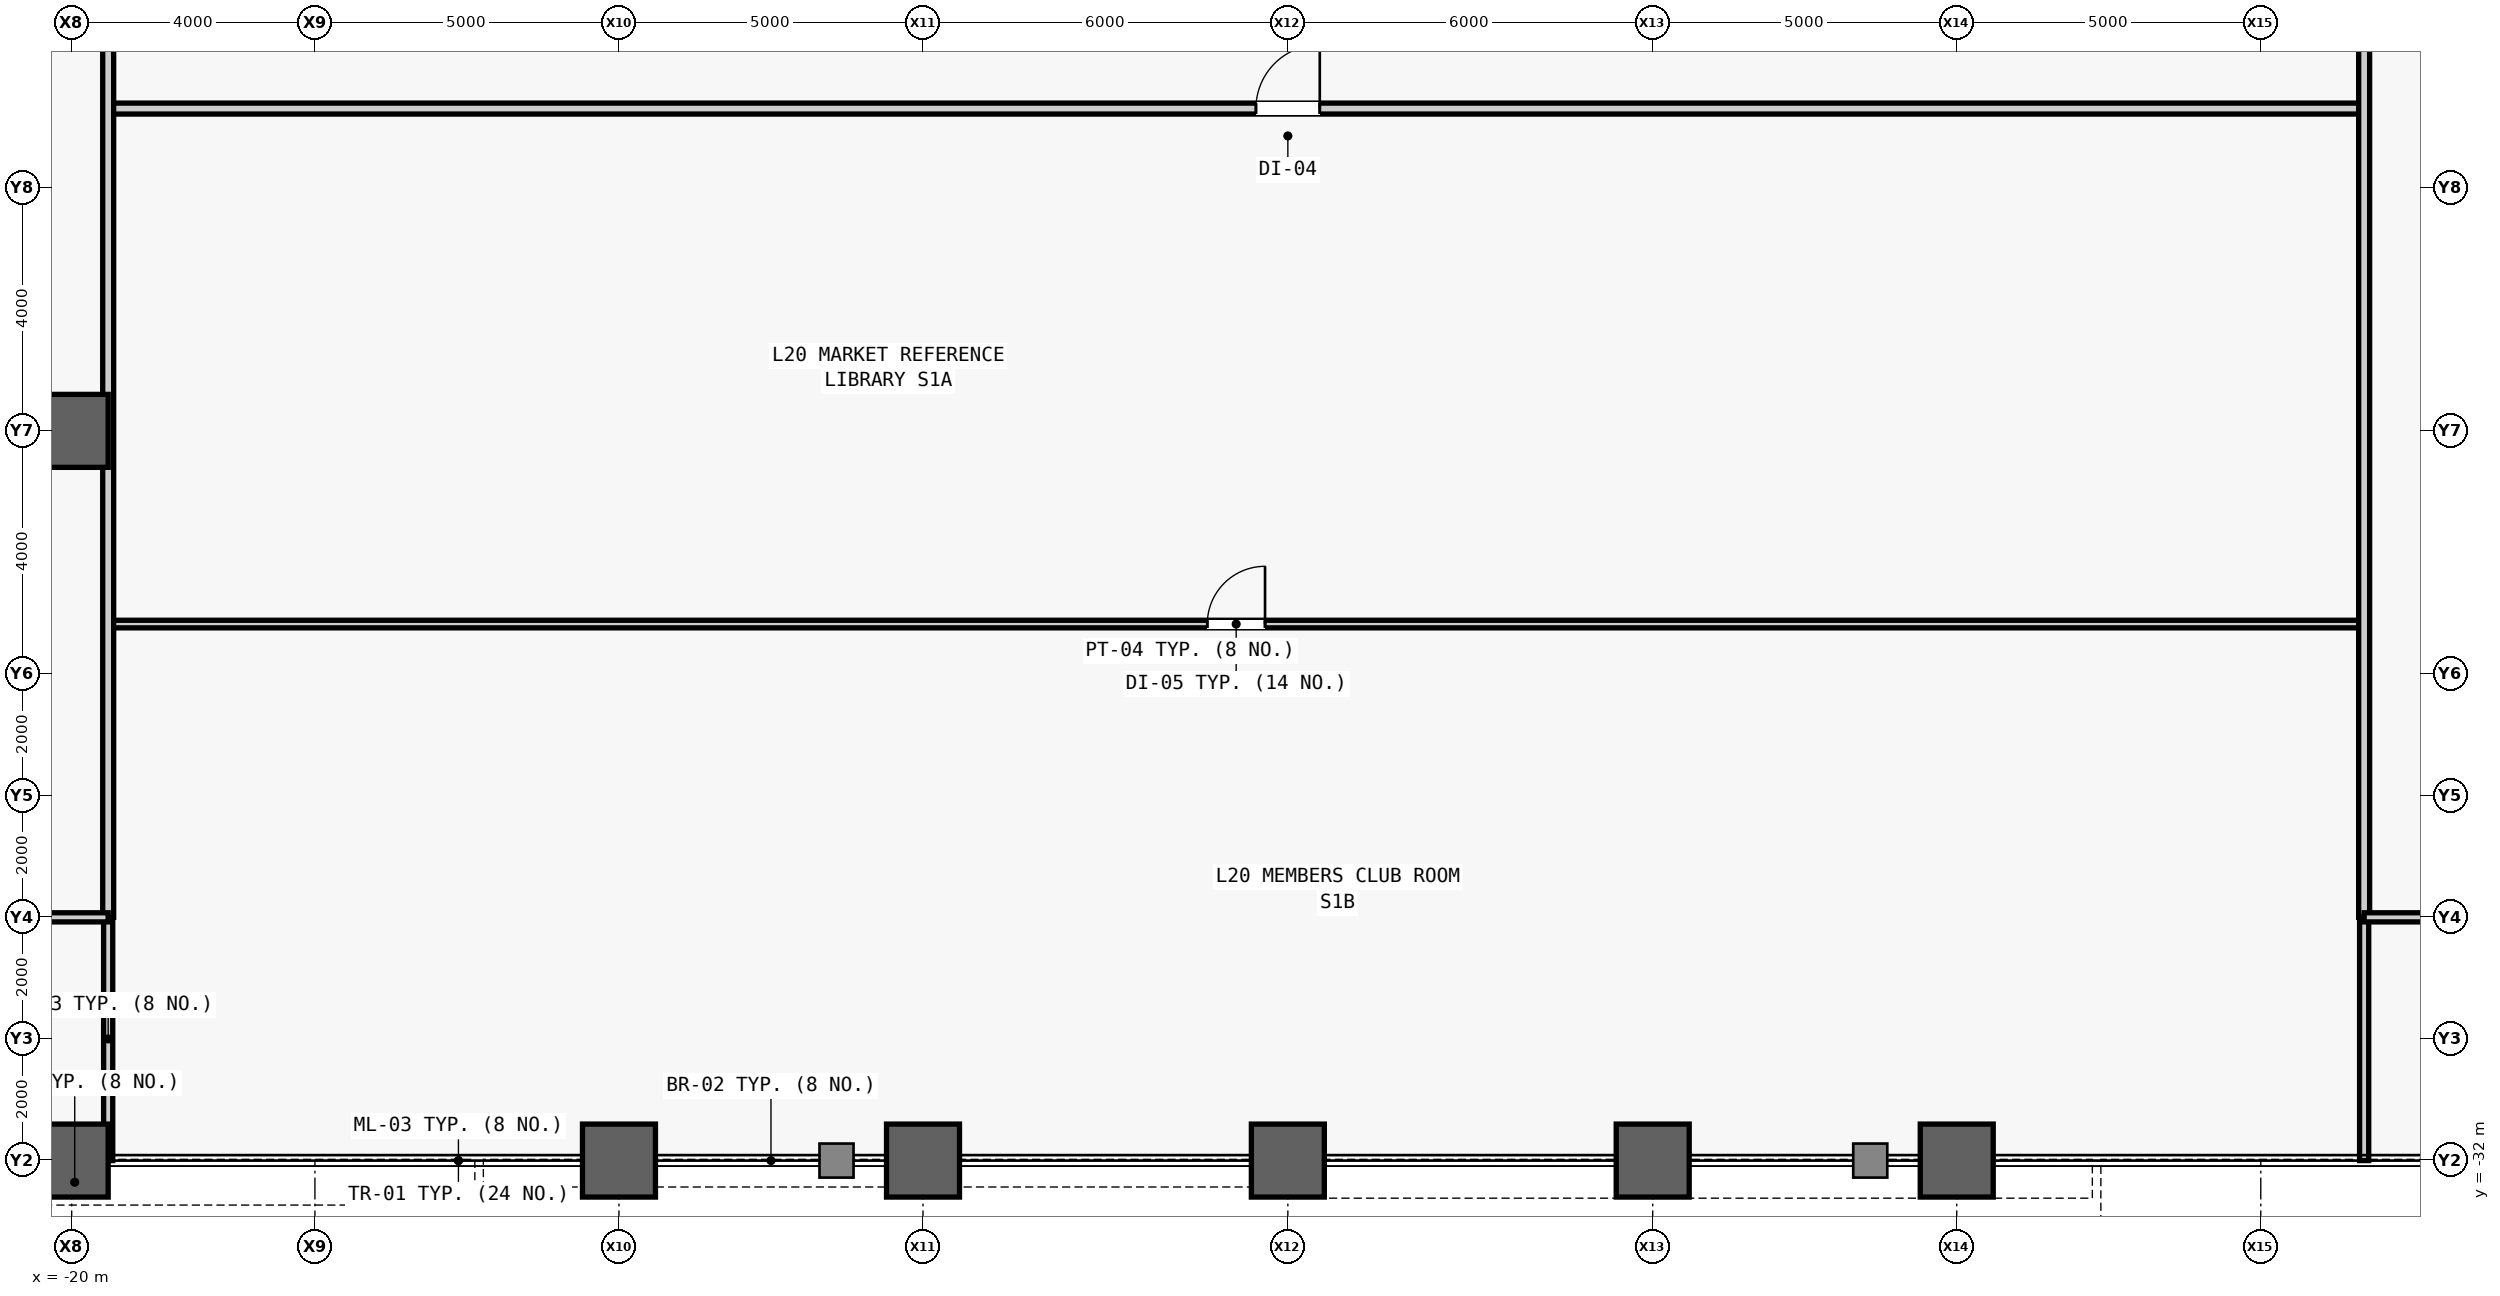
"""IFC4 building model, lengths in metres.
Left out: names, types, materials, properties, quantities, classifications, styles, units other than length and angle.
Written with IfcOpenShell. Run it as: python <this file> out.ifc"""

import sys

from ifc_helpers import new_model, si_unit, direction, frame, frame_2d, origin, origin_2d, place, context, subcontext, project, spatial, rectangle, hollow_rectangle, extrude, source, transform, mapped, element, fill, save


model = new_model("IFC4")
c1 = context("Model", 3, precision=1e-05, world=origin(), true_north=direction((0.0, 1.0)))
c2 = subcontext(c1, "Body", "Model", "MODEL_VIEW")
j1 = project(units=[si_unit("LENGTHUNIT", "METRE"), si_unit("PLANEANGLEUNIT", "RADIAN")], contexts=[c1])
p1 = place(None, origin())
s1 = spatial("IfcSite", under=j1, at=p1, CompositionType="ELEMENT")
p2 = place(p1, origin())
s2 = spatial("IfcBuilding", under=s1, at=p2, CompositionType="ELEMENT")
p3 = place(p2, frame((0.0, 0.0, 91.4)))
s3 = spatial("IfcBuildingStorey", under=s2, at=p3, CompositionType="ELEMENT", Elevation=91.4)
m1 = source(origin(), c2, "Body", "SweptSolid", [
    extrude(hollow_rectangle(XDim=1.2, YDim=1.2, WallThickness=0.07, at=origin_2d()), origin(), (0.0, 0.0, 1.0), 4.1),
])
for number, where, z_axis, x_axis in (
    (1, (-20.0, -32.0, 0.0), (0.0, 0.0, 1.0), (1.0, 0.0, 0.0)),
    (2, (-20.0, -20.0, 0.0), (0.0, 0.0, 1.0), (1.0, 0.0, 0.0)),
    (3, (-11.0, -32.0, 0.0), (0.0, 0.0, 1.0), (1.0, 0.0, 0.0)),
    (4, (-6.0, -32.0, 0.0), (0.0, 0.0, 1.0), (1.0, 0.0, 0.0)),
    (5, (0.0, -32.0, 0.0), (0.0, 0.0, 1.0), (1.0, 0.0, 0.0)),
    (6, (6.0, -32.0, 0.0), (0.0, 0.0, 1.0), (1.0, 0.0, 0.0)),
    (7, (11.0, -32.0, 0.0), (0.0, 0.0, 1.0), (1.0, 0.0, 0.0)),
):
    element("IfcColumn", number, at=place(p3, frame(where, z_axis=z_axis, x_axis=x_axis)), inside=s3, PredefinedType="COLUMN", context=c2, shape_type="MappedRepresentation", body=[
        mapped(m1, transform((0.0, 0.0, 0.0), scale=1.0)),
    ])
m2 = source(origin(), c2, "Body", "SweptSolid", [
    extrude(rectangle(XDim=37.1, YDim=0.125, at=frame_2d((18.55, 0.0))), origin(), (0.0, 0.0, 1.0), 3.84),
])
p4 = place(p3, frame((-19.4, -23.177, 0.0), z_axis=(0.0, 0.0, 1.0), x_axis=(1.0, 0.0, 0.0)))
e8 = element("IfcWall", 8, at=p4, inside=s3, PredefinedType="PARTITIONING", context=c2, shape_type="MappedRepresentation", body=[
    mapped(m2, transform((0.0, 0.0, 0.0), scale=1.0)),
])
m3 = source(origin(), c2, "Body", "SweptSolid", [
    extrude(rectangle(XDim=0.95, YDim=2.15, at=frame_2d((0.475, 1.075))), frame((0.0, 0.073, 0.0), z_axis=(0.0, -1.0, 0.0), x_axis=(1.0, 0.0, 0.0)), (0.0, 0.0, 1.0), 0.145),
])
p5 = place(p4, frame((18.075, 0.0, 0.0)))
e9 = element("IfcOpeningElement", 9, at=p5, cuts=e8, PredefinedType="OPENING", context=c2, shape_type="MappedRepresentation", body=[
    mapped(m3, transform((0.0, 0.0, 0.0), scale=1.0)),
])
m4 = source(origin(), c2, "Body", "SweptSolid", [
    extrude(rectangle(XDim=37.1, YDim=0.18, at=frame_2d((18.55, 0.0))), origin(), (0.0, 0.0, 1.0), 3.84),
])
p6 = place(p3, frame((-19.4, -14.7, 0.0), z_axis=(0.0, 0.0, 1.0), x_axis=(1.0, 0.0, 0.0)))
e10 = element("IfcWall", 10, at=p6, inside=s3, PredefinedType="PARTITIONING", context=c2, shape_type="MappedRepresentation", body=[
    mapped(m4, transform((0.0, 0.0, 0.0), scale=1.0)),
])
m5 = source(origin(), c2, "Body", "SweptSolid", [
    extrude(rectangle(XDim=1.05, YDim=2.2, at=frame_2d((0.525, 1.1))), frame((0.0, 0.1, 0.0), z_axis=(0.0, -1.0, 0.0), x_axis=(1.0, 0.0, 0.0)), (0.0, 0.0, 1.0), 0.2),
])
p7 = place(p6, frame((18.875, 0.0, 0.0)))
e11 = element("IfcOpeningElement", 11, at=p7, cuts=e10, PredefinedType="OPENING", context=c2, shape_type="MappedRepresentation", body=[
    mapped(m5, transform((0.0, 0.0, 0.0), scale=1.0)),
])
m6 = source(origin(), c2, "Body", "SweptSolid", [
    extrude(rectangle(XDim=4.0, YDim=0.15, at=frame_2d((2.0, 0.0))), origin(), (0.0, 0.0, 1.0), 3.84),
])
for number, where, z_axis, x_axis in (
    (12, (-19.4, -32.0, 0.0), (0.0, 0.0, 1.0), (0.0, 1.0, 0.0)),
    (13, (17.7, -32.0, 0.0), (0.0, 0.0, 1.0), (0.0, 1.0, 0.0)),
):
    element("IfcWall", number, at=place(p3, frame(where, z_axis=z_axis, x_axis=x_axis)), inside=s3, PredefinedType="PARTITIONING", context=c2, shape_type="MappedRepresentation", body=[
        mapped(m6, transform((0.0, 0.0, 0.0), scale=1.0)),
    ])
m7 = source(origin(), c2, "Body", "SweptSolid", [
    extrude(rectangle(XDim=56.0, YDim=0.18, at=frame_2d((28.0, 0.0))), origin(), (0.0, 0.0, 1.0), 3.371),
])
p8 = place(p3, frame((-19.4, -28.0, 0.0), z_axis=(0.0, 0.0, 1.0), x_axis=(0.0, 1.0, 0.0)))
e14 = element("IfcWall", 14, at=p8, inside=s3, PredefinedType="PARTITIONING", context=c2, shape_type="MappedRepresentation", body=[
    mapped(m7, transform((0.0, 0.0, 0.0), scale=1.0)),
])
m8 = source(origin(), c2, "Body", "SweptSolid", [
    extrude(rectangle(XDim=0.95, YDim=2.15, at=frame_2d((0.475, 1.075))), frame((0.0, 0.1, 0.0), z_axis=(0.0, -1.0, 0.0), x_axis=(1.0, 0.0, 0.0)), (0.0, 0.0, 1.0), 0.2),
])
p9 = place(p8, frame((16.299, 0.0, 0.0)))
e15 = element("IfcOpeningElement", 15, at=p9, cuts=e14, PredefinedType="OPENING", context=c2, shape_type="MappedRepresentation", body=[
    mapped(m8, transform((0.0, 0.0, 0.0), scale=1.0)),
])
p10 = place(p8, frame((22.923, 0.0, 0.0)))
e16 = element("IfcOpeningElement", 16, at=p10, cuts=e14, PredefinedType="OPENING", context=c2, shape_type="MappedRepresentation", body=[
    mapped(m8, transform((0.0, 0.0, 0.0), scale=1.0)),
])
p11 = place(p8, frame((30.712, 0.0, 0.0)))
e17 = element("IfcOpeningElement", 17, at=p11, cuts=e14, PredefinedType="OPENING", context=c2, shape_type="MappedRepresentation", body=[
    mapped(m8, transform((0.0, 0.0, 0.0), scale=1.0)),
])
p12 = place(p8, frame((37.913, 0.0, 0.0)))
e18 = element("IfcOpeningElement", 18, at=p12, cuts=e14, PredefinedType="OPENING", context=c2, shape_type="MappedRepresentation", body=[
    mapped(m8, transform((0.0, 0.0, 0.0), scale=1.0)),
])
m9 = source(origin(), c2, "Body", "SweptSolid", [
    extrude(rectangle(XDim=56.0, YDim=0.18, at=frame_2d((28.0, 0.0))), origin(), (0.0, 0.0, 1.0), 3.84),
])
p13 = place(p3, frame((17.7, -28.0, 0.0), z_axis=(0.0, 0.0, 1.0), x_axis=(0.0, 1.0, 0.0)))
e19 = element("IfcWall", 19, at=p13, inside=s3, PredefinedType="PARTITIONING", context=c2, shape_type="MappedRepresentation", body=[
    mapped(m9, transform((0.0, 0.0, 0.0), scale=1.0)),
])
p14 = place(p13, frame((16.587, 0.0, 0.0)))
e20 = element("IfcOpeningElement", 20, at=p14, cuts=e19, PredefinedType="OPENING", context=c2, shape_type="MappedRepresentation", body=[
    mapped(m8, transform((0.0, 0.0, 0.0), scale=1.0)),
])
p15 = place(p13, frame((23.788, 0.0, 0.0)))
e21 = element("IfcOpeningElement", 21, at=p15, cuts=e19, PredefinedType="OPENING", context=c2, shape_type="MappedRepresentation", body=[
    mapped(m8, transform((0.0, 0.0, 0.0), scale=1.0)),
])
p16 = place(p13, frame((31.577, 0.0, 0.0)))
e22 = element("IfcOpeningElement", 22, at=p16, cuts=e19, PredefinedType="OPENING", context=c2, shape_type="MappedRepresentation", body=[
    mapped(m8, transform((0.0, 0.0, 0.0), scale=1.0)),
])
p17 = place(p13, frame((38.201, 0.0, 0.0)))
e23 = element("IfcOpeningElement", 23, at=p17, cuts=e19, PredefinedType="OPENING", context=c2, shape_type="MappedRepresentation", body=[
    mapped(m8, transform((0.0, 0.0, 0.0), scale=1.0)),
])
m10 = source(origin(), c2, "Body", "SweptSolid", [
    extrude(rectangle(XDim=8.6, YDim=0.15, at=frame_2d((4.3, 0.0))), origin(), (0.0, 0.0, 1.0), 3.84),
])
p18 = place(p3, frame((-28.0, -28.0, 0.0), z_axis=(0.0, 0.0, 1.0), x_axis=(1.0, 0.0, 0.0)))
e24 = element("IfcWall", 24, at=p18, inside=s3, PredefinedType="PARTITIONING", context=c2, shape_type="MappedRepresentation", body=[
    mapped(m10, transform((0.0, 0.0, 0.0), scale=1.0)),
])
m11 = source(origin(), c2, "Body", "SweptSolid", [
    extrude(rectangle(XDim=0.95, YDim=2.15, at=frame_2d((0.475, 1.075))), frame((0.0, 0.085, 0.0), z_axis=(0.0, -1.0, 0.0), x_axis=(1.0, 0.0, 0.0)), (0.0, 0.0, 1.0), 0.17),
])
p19 = place(p18, frame((3.825, 0.0, 0.0)))
e25 = element("IfcOpeningElement", 25, at=p19, cuts=e24, PredefinedType="OPENING", context=c2, shape_type="MappedRepresentation", body=[
    mapped(m11, transform((0.0, 0.0, 0.0), scale=1.0)),
])
m12 = source(origin(), c2, "Body", "SweptSolid", [
    extrude(rectangle(XDim=10.3, YDim=0.15, at=frame_2d((5.15, 0.0))), origin(), (0.0, 0.0, 1.0), 3.84),
])
p20 = place(p3, frame((17.7, -28.0, 0.0), z_axis=(0.0, 0.0, 1.0), x_axis=(1.0, 0.0, 0.0)))
e26 = element("IfcWall", 26, at=p20, inside=s3, PredefinedType="PARTITIONING", context=c2, shape_type="MappedRepresentation", body=[
    mapped(m12, transform((0.0, 0.0, 0.0), scale=1.0)),
])
p21 = place(p20, frame((4.675, 0.0, 0.0)))
e27 = element("IfcOpeningElement", 27, at=p21, cuts=e26, PredefinedType="OPENING", context=c2, shape_type="MappedRepresentation", body=[
    mapped(m11, transform((0.0, 0.0, 0.0), scale=1.0)),
])
m13 = source(origin(), c2, "Body", "SweptSolid", [
    extrude(rectangle(XDim=0.95, YDim=2.15, at=frame_2d((0.475, 1.075))), frame((0.0, 0.025, 0.0), z_axis=(0.0, -1.0, 0.0), x_axis=(1.0, 0.0, 0.0)), (0.0, 0.0, 1.0), 0.05),
])
p22 = place(p5, origin())
e28 = element("IfcDoor", 28, at=p22, inside=s3, OperationType="SINGLE_SWING_RIGHT", PredefinedType="DOOR", context=c2, shape_type="MappedRepresentation", body=[
    mapped(m13, transform((0.0, 0.0, 0.0), scale=1.0)),
])
fill(e9, e28)
m14 = source(origin(), c2, "Body", "SweptSolid", [
    extrude(rectangle(XDim=1.05, YDim=2.2, at=frame_2d((0.525, 1.1))), frame((0.0, 0.025, 0.0), z_axis=(0.0, -1.0, 0.0), x_axis=(1.0, 0.0, 0.0)), (0.0, 0.0, 1.0), 0.05),
])
p23 = place(p7, origin())
e29 = element("IfcDoor", 29, at=p23, inside=s3, OperationType="SINGLE_SWING_RIGHT", PredefinedType="DOOR", context=c2, shape_type="MappedRepresentation", body=[
    mapped(m14, transform((0.0, 0.0, 0.0), scale=1.0)),
])
fill(e11, e29)
save(model, sys.argv[1])
